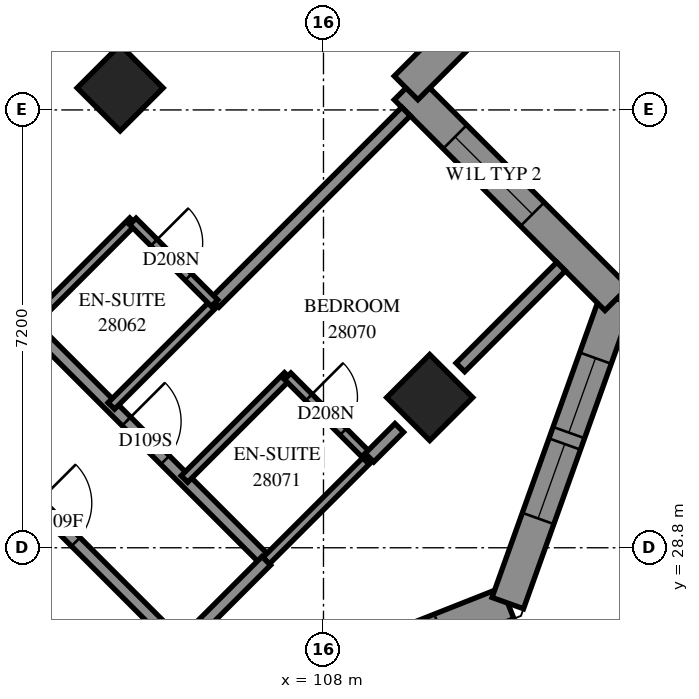
"""IFC4 building model, lengths in metres.
Left out: names, types, materials, properties, quantities, classifications, styles, units other than length and angle.
Written with IfcOpenShell. Run it as: python <this file> out.ifc"""

import sys

from ifc_helpers import new_model, si_unit, direction, frame, frame_2d, origin, origin_2d, place, context, subcontext, project, spatial, polyline, rectangle, outline, extrude, element, fill, save


model = new_model("IFC4")
c1 = context("Model", 3, precision=1e-05, world=origin(), true_north=direction((0.0, 1.0)))
c2 = subcontext(c1, "Body", "Model", "MODEL_VIEW")
j1 = project(units=[si_unit("LENGTHUNIT", "METRE"), si_unit("PLANEANGLEUNIT", "RADIAN")], contexts=[c1])
p1 = place(None, origin())
s1 = spatial("IfcSite", under=j1, at=p1, CompositionType="ELEMENT")
p2 = place(p1, origin())
s2 = spatial("IfcBuilding", under=s1, at=p2, CompositionType="ELEMENT")
p3 = place(p2, frame((0.0, 0.0, 105.0)))
s3 = spatial("IfcBuildingStorey", under=s2, at=p3, CompositionType="ELEMENT", Elevation=105.0)
for number, where, z_axis, x_axis in (
    (1, (104.656, 36.362, 0.0), (0.0, 0.0, 1.0), (0.707, -0.707, 0.0)),
    (2, (109.747, 31.271, 0.0), (0.0, 0.0, 1.0), (0.707, -0.707, 0.0)),
):
    element("IfcColumn", number, at=place(p3, frame(where, z_axis=z_axis, x_axis=x_axis)), inside=s3, PredefinedType="COLUMN", context=c2, shape_type="SweptSolid", body=[
        extrude(rectangle(XDim=1.0, YDim=1.0, at=origin_2d()), origin(), (0.0, 0.0, 1.0), 3.1),
    ])
p4 = place(p3, frame((105.889, 25.857, 0.0), z_axis=(0.0, 0.0, 1.0), x_axis=(0.9299302272, 0.3677360094, 0.0)))
e3 = element("IfcWall", 3, at=p4, inside=s3, PredefinedType="SOLIDWALL", context=c2, shape_type="SweptSolid", body=[
    extrude(outline(polyline([(0.119, -0.275), (5.653, -0.275), (5.404, 0.275), (-0.119, 0.275), (0.119, -0.275)])), origin(), (0.0, 0.0, 1.0), 3.1),
])
p5 = place(p4, frame((0.635, 0.0, 0.5)))
e4 = element("IfcOpeningElement", 4, at=p5, cuts=e3, PredefinedType="OPENING", context=c2, shape_type="SweptSolid", body=[
    extrude(rectangle(XDim=1.2, YDim=2.45, at=frame_2d((0.6, 1.225))), frame((0.0, 0.285, 0.0), z_axis=(0.0, -1.0, 0.0), x_axis=(1.0, 0.0, 0.0)), (0.0, 0.0, 1.0), 0.57),
])
p6 = place(p4, frame((3.137, 0.0, 0.5)))
e5 = element("IfcOpeningElement", 5, at=p6, cuts=e3, PredefinedType="OPENING", context=c2, shape_type="SweptSolid", body=[
    extrude(rectangle(XDim=1.2, YDim=2.45, at=frame_2d((0.6, 1.225))), frame((0.0, 0.285, 0.0), z_axis=(0.0, -1.0, 0.0), x_axis=(1.0, 0.0, 0.0)), (0.0, 0.0, 1.0), 0.57),
])
p7 = place(p3, frame((111.031, 27.89, 0.0), z_axis=(0.0, 0.0, 1.0), x_axis=(0.3371475074, 0.9414518353, 0.0)))
e6 = element("IfcWall", 6, at=p7, inside=s3, PredefinedType="SOLIDWALL", context=c2, shape_type="SweptSolid", body=[
    extrude(outline(polyline([(-0.124, -0.275), (5.492, -0.275), (5.144, 0.275), (0.124, 0.275), (-0.124, -0.275)])), origin(), (0.0, 0.0, 1.0), 3.1),
])
p8 = place(p7, frame((1.479, 0.0, 0.5)))
e7 = element("IfcOpeningElement", 7, at=p8, cuts=e6, PredefinedType="OPENING", context=c2, shape_type="SweptSolid", body=[
    extrude(rectangle(XDim=1.3, YDim=2.45, at=frame_2d((0.65, 1.225))), frame((0.0, 0.285, 0.0), z_axis=(0.0, -1.0, 0.0), x_axis=(1.0, 0.0, 0.0)), (0.0, 0.0, 1.0), 0.57),
])
p9 = place(p7, frame((2.979, 0.0, 0.5)))
e8 = element("IfcOpeningElement", 8, at=p9, cuts=e6, PredefinedType="OPENING", context=c2, shape_type="SweptSolid", body=[
    extrude(rectangle(XDim=1.3, YDim=2.45, at=frame_2d((0.65, 1.225))), frame((0.0, 0.285, 0.0), z_axis=(0.0, -1.0, 0.0), x_axis=(1.0, 0.0, 0.0)), (0.0, 0.0, 1.0), 0.57),
])
p10 = place(p3, frame((112.823, 32.896, 0.0), z_axis=(0.0, 0.0, 1.0), x_axis=(-0.7071067812, 0.7071067812, 0.0)))
e9 = element("IfcWall", 9, at=p10, inside=s3, PredefinedType="SOLIDWALL", context=c2, shape_type="SweptSolid", body=[
    extrude(outline(polyline([(-0.174, -0.275), (4.626, -0.275), (5.176, 0.275), (0.174, 0.275), (-0.174, -0.275)])), origin(), (0.0, 0.0, 1.0), 3.1),
])
p11 = place(p10, frame((1.963, 0.0, 0.6)))
e10 = element("IfcOpeningElement", 10, at=p11, cuts=e9, PredefinedType="OPENING", context=c2, shape_type="SweptSolid", body=[
    extrude(rectangle(XDim=1.8, YDim=1.9, at=frame_2d((0.9, 0.95))), frame((0.0, 0.285, 0.0), z_axis=(0.0, -1.0, 0.0), x_axis=(1.0, 0.0, 0.0)), (0.0, 0.0, 1.0), 0.57),
])
p12 = place(p3, frame((109.358, 36.362, 0.0), z_axis=(0.0, 0.0, 1.0), x_axis=(0.7071067812, 0.7071067812, 0.0)))
e11 = element("IfcWall", 11, at=p12, inside=s3, PredefinedType="SOLIDWALL", context=c2, shape_type="SweptSolid", body=[
    extrude(outline(polyline([(0.275, -0.275), (6.187, -0.275), (5.429, 0.275), (-0.275, 0.275), (0.275, -0.275)])), origin(), (0.0, 0.0, 1.0), 3.1),
])
p13 = place(p12, frame((1.137, 0.0, 0.6)))
e12 = element("IfcOpeningElement", 12, at=p13, cuts=e11, PredefinedType="OPENING", context=c2, shape_type="SweptSolid", body=[
    extrude(rectangle(XDim=1.8, YDim=1.9, at=frame_2d((0.9, 0.95))), frame((0.0, 0.285, 0.0), z_axis=(0.0, -1.0, 0.0), x_axis=(1.0, 0.0, 0.0)), (0.0, 0.0, 1.0), 0.57),
])
p14 = place(p3, frame((92.004, 40.819, 0.0), z_axis=(0.0, 0.0, 1.0), x_axis=(0.7071067812, -0.7071067812, 0.0)))
e13 = element("IfcWall", 13, at=p14, inside=s3, PredefinedType="PARTITIONING", context=c2, shape_type="SweptSolid", body=[
    extrude(rectangle(XDim=19.298, YDim=0.2, at=frame_2d((9.649, 0.0))), origin(), (0.0, 0.0, 1.0), 3.1),
])
p15 = place(p14, frame((3.489, 0.0, 0.0)))
e14 = element("IfcOpeningElement", 14, at=p15, cuts=e13, PredefinedType="OPENING", context=c2, shape_type="SweptSolid", body=[
    extrude(rectangle(XDim=0.9, YDim=2.1, at=frame_2d((0.45, 1.05))), frame((0.0, 0.11, 0.0), z_axis=(0.0, -1.0, 0.0), x_axis=(1.0, 0.0, 0.0)), (0.0, 0.0, 1.0), 0.22),
])
p16 = place(p14, frame((9.319, 0.0, 0.0)))
e15 = element("IfcOpeningElement", 15, at=p16, cuts=e13, PredefinedType="OPENING", context=c2, shape_type="SweptSolid", body=[
    extrude(rectangle(XDim=0.9, YDim=2.1, at=frame_2d((0.45, 1.05))), frame((0.0, 0.11, 0.0), z_axis=(0.0, -1.0, 0.0), x_axis=(1.0, 0.0, 0.0)), (0.0, 0.0, 1.0), 0.22),
])
p17 = place(p14, frame((15.961, 0.0, 0.0)))
e16 = element("IfcOpeningElement", 16, at=p17, cuts=e13, PredefinedType="OPENING", context=c2, shape_type="SweptSolid", body=[
    extrude(rectangle(XDim=0.9, YDim=2.1, at=frame_2d((0.45, 1.05))), frame((0.0, 0.11, 0.0), z_axis=(0.0, -1.0, 0.0), x_axis=(1.0, 0.0, 0.0)), (0.0, 0.0, 1.0), 0.22),
])
p18 = place(p3, frame((99.423, 36.221, 0.0), z_axis=(0.0, 0.0, 1.0), x_axis=(0.7071067812, 0.7071067812, 0.0)))
e17 = element("IfcWall", 17, at=p18, inside=s3, PredefinedType="PARTITIONING", context=c2, shape_type="SweptSolid", body=[
    extrude(rectangle(XDim=12.099, YDim=0.2, at=frame_2d((6.049, 0.0))), origin(), (0.0, 0.0, 1.0), 3.1),
])
p19 = place(p3, frame((103.239, 32.399, 0.0), z_axis=(0.0, 0.0, 1.0), x_axis=(0.7071067812, -0.7071067812, 0.0)))
e18 = element("IfcWall", 18, at=p19, inside=s3, PredefinedType="PARTITIONING", context=c2, shape_type="SweptSolid", body=[
    extrude(rectangle(XDim=5.399, YDim=0.2, at=frame_2d((2.7, 0.0))), origin(), (0.0, 0.0, 1.0), 3.1),
])
p20 = place(p19, frame((2.15, 0.0, 0.0)))
e19 = element("IfcOpeningElement", 19, at=p20, cuts=e18, PredefinedType="OPENING", context=c2, shape_type="SweptSolid", body=[
    extrude(rectangle(XDim=0.9, YDim=2.1, at=frame_2d((0.45, 1.05))), frame((0.0, 0.11, 0.0), z_axis=(0.0, -1.0, 0.0), x_axis=(1.0, 0.0, 0.0)), (0.0, 0.0, 1.0), 0.22),
])
p21 = place(p3, frame((106.211, 32.827, 0.0), z_axis=(0.0, 0.0, 1.0), x_axis=(0.7071067812, 0.7071067812, 0.0)))
e20 = element("IfcWall", 20, at=p21, inside=s3, PredefinedType="PARTITIONING", context=c2, shape_type="SweptSolid", body=[
    extrude(rectangle(XDim=4.45, YDim=0.2, at=frame_2d((2.225, 0.0))), origin(), (0.0, 0.0, 1.0), 3.1),
])
p22 = place(p3, frame((103.169, 32.473, 0.0), z_axis=(0.0, 0.0, 1.0), x_axis=(0.7071067812, 0.7071067812, 0.0)))
e21 = element("IfcWall", 21, at=p22, inside=s3, PredefinedType="PARTITIONING", context=c2, shape_type="SweptSolid", body=[
    extrude(rectangle(XDim=2.401, YDim=0.15, at=frame_2d((1.201, 0.0))), origin(), (0.0, 0.0, 1.0), 3.1),
])
for number, where, z_axis, x_axis in (
    (22, (104.511, 31.133, 0.0), (0.0, 0.0, 1.0), (0.708, 0.707, 0.0)),
    (23, (105.713, 29.931, 0.0), (0.0, 0.0, 1.0), (0.708, 0.707, 0.0)),
):
    element("IfcWall", number, at=place(p3, frame(where, z_axis=z_axis, x_axis=x_axis)), inside=s3, PredefinedType="PARTITIONING", context=c2, shape_type="SweptSolid", body=[
        extrude(rectangle(XDim=2.4, YDim=0.15, at=frame_2d((1.2, 0.0))), origin(), (0.0, 0.0, 1.0), 3.1),
    ])
p23 = place(p3, frame((107.057, 28.587, 0.0), z_axis=(0.0, 0.0, 1.0), x_axis=(0.7075233388, 0.706689978, 0.0)))
e24 = element("IfcWall", 24, at=p23, inside=s3, PredefinedType="PARTITIONING", context=c2, shape_type="SweptSolid", body=[
    extrude(rectangle(XDim=2.4, YDim=0.15, at=frame_2d((1.2, 0.0))), origin(), (0.0, 0.0, 1.0), 2.6),
])
p24 = place(p3, frame((110.251, 31.767, 0.0), z_axis=(0.0, 0.0, 1.0), x_axis=(0.7066584143, 0.7075548639, 0.0)))
e25 = element("IfcWall", 25, at=p24, inside=s3, PredefinedType="PARTITIONING", context=c2, shape_type="SweptSolid", body=[
    extrude(rectangle(XDim=2.343, YDim=0.2, at=frame_2d((1.171, 0.0))), origin(), (0.0, 0.0, 1.0), 3.1),
])
p25 = place(p3, frame((105.645, 27.171, 0.0), z_axis=(0.0, 0.0, 1.0), x_axis=(0.7071067812, 0.7071067812, 0.0)))
e26 = element("IfcWall", 26, at=p25, inside=s3, PredefinedType="PARTITIONING", context=c2, shape_type="SweptSolid", body=[
    extrude(rectangle(XDim=2.0, YDim=0.2, at=frame_2d((1.0, 0.0))), origin(), (0.0, 0.0, 1.0), 2.6),
])
p26 = place(p3, frame((107.411, 31.621, 0.0), z_axis=(0.0, 0.0, 1.0), x_axis=(0.7071067812, -0.7071067812, 0.0)))
e27 = element("IfcWall", 27, at=p26, inside=s3, PredefinedType="PARTITIONING", context=c2, shape_type="SweptSolid", body=[
    extrude(rectangle(XDim=1.901, YDim=0.15, at=frame_2d((0.95, 0.0))), origin(), (0.0, 0.0, 1.0), 3.1),
])
p27 = place(p26, frame((0.493, 0.0, 0.0)))
e28 = element("IfcOpeningElement", 28, at=p27, cuts=e27, PredefinedType="OPENING", context=c2, shape_type="SweptSolid", body=[
    extrude(rectangle(XDim=0.8, YDim=2.1, at=frame_2d((0.4, 1.05))), frame((0.0, 0.085, 0.0), z_axis=(0.0, -1.0, 0.0), x_axis=(1.0, 0.0, 0.0)), (0.0, 0.0, 1.0), 0.17),
])
p28 = place(p3, frame((104.865, 34.167, 0.0), z_axis=(0.0, 0.0, 1.0), x_axis=(0.7071067812, -0.7071067812, 0.0)))
e29 = element("IfcWall", 29, at=p28, inside=s3, PredefinedType="PARTITIONING", context=c2, shape_type="SweptSolid", body=[
    extrude(rectangle(XDim=1.901, YDim=0.15, at=frame_2d((0.95, 0.0))), origin(), (0.0, 0.0, 1.0), 3.1),
])
p29 = place(p28, frame((0.493, 0.0, 0.0)))
e30 = element("IfcOpeningElement", 30, at=p29, cuts=e29, PredefinedType="OPENING", context=c2, shape_type="SweptSolid", body=[
    extrude(rectangle(XDim=0.8, YDim=2.1, at=frame_2d((0.4, 1.05))), frame((0.0, 0.085, 0.0), z_axis=(0.0, -1.0, 0.0), x_axis=(1.0, 0.0, 0.0)), (0.0, 0.0, 1.0), 0.17),
])
p30 = place(p3, frame((108.756, 30.282, 0.0), z_axis=(0.0, 0.0, 1.0), x_axis=(0.7071067812, 0.7071067812, 0.0)))
e31 = element("IfcWall", 31, at=p30, inside=s3, PredefinedType="PARTITIONING", context=c2, shape_type="SweptSolid", body=[
    extrude(rectangle(XDim=0.693, YDim=0.2, at=frame_2d((0.346, 0.0))), origin(), (0.0, 0.0, 1.0), 2.6),
])
p31 = place(p8, origin())
e32 = element("IfcWindow", 32, at=p31, inside=s3, PartitioningType="SINGLE_PANEL", PredefinedType="WINDOW", context=c2, shape_type="SweptSolid", body=[
    extrude(rectangle(XDim=1.3, YDim=2.45, at=frame_2d((0.65, 1.225))), frame((0.0, 0.155, 0.0), z_axis=(0.0, -1.0, 0.0), x_axis=(1.0, 0.0, 0.0)), (0.0, 0.0, 1.0), 0.06),
])
fill(e7, e32)
p32 = place(p9, origin())
e33 = element("IfcWindow", 33, at=p32, inside=s3, PartitioningType="SINGLE_PANEL", PredefinedType="WINDOW", context=c2, shape_type="SweptSolid", body=[
    extrude(rectangle(XDim=1.3, YDim=2.45, at=frame_2d((0.65, 1.225))), frame((0.0, 0.155, 0.0), z_axis=(0.0, -1.0, 0.0), x_axis=(1.0, 0.0, 0.0)), (0.0, 0.0, 1.0), 0.06),
])
fill(e8, e33)
p33 = place(p11, origin())
e34 = element("IfcWindow", 34, at=p33, inside=s3, PartitioningType="SINGLE_PANEL", PredefinedType="WINDOW", context=c2, shape_type="SweptSolid", body=[
    extrude(rectangle(XDim=1.8, YDim=1.9, at=frame_2d((0.9, 0.95))), frame((0.0, 0.155, 0.0), z_axis=(0.0, -1.0, 0.0), x_axis=(1.0, 0.0, 0.0)), (0.0, 0.0, 1.0), 0.06),
])
fill(e10, e34)
p34 = place(p29, origin())
e35 = element("IfcDoor", 35, at=p34, inside=s3, OperationType="SINGLE_SWING_RIGHT", PredefinedType="DOOR", context=c2, shape_type="SweptSolid", body=[
    extrude(rectangle(XDim=0.8, YDim=2.1, at=frame_2d((0.4, 1.05))), frame((0.0, 0.025, 0.0), z_axis=(0.0, -1.0, 0.0), x_axis=(1.0, 0.0, 0.0)), (0.0, 0.0, 1.0), 0.05),
])
fill(e30, e35)
p35 = place(p17, origin())
e36 = element("IfcDoor", 36, at=p35, inside=s3, OperationType="SINGLE_SWING_RIGHT", PredefinedType="DOOR", context=c2, shape_type="SweptSolid", body=[
    extrude(rectangle(XDim=0.9, YDim=2.1, at=frame_2d((0.45, 1.05))), frame((0.0, 0.025, 0.0), z_axis=(0.0, -1.0, 0.0), x_axis=(1.0, 0.0, 0.0)), (0.0, 0.0, 1.0), 0.05),
])
fill(e16, e36)
p36 = place(p20, origin())
e37 = element("IfcDoor", 37, at=p36, inside=s3, OperationType="SINGLE_SWING_RIGHT", PredefinedType="DOOR", context=c2, shape_type="SweptSolid", body=[
    extrude(rectangle(XDim=0.9, YDim=2.1, at=frame_2d((0.45, 1.05))), frame((0.0, 0.025, 0.0), z_axis=(0.0, -1.0, 0.0), x_axis=(1.0, 0.0, 0.0)), (0.0, 0.0, 1.0), 0.05),
])
fill(e19, e37)
p37 = place(p27, origin())
e38 = element("IfcDoor", 38, at=p37, inside=s3, OperationType="SINGLE_SWING_RIGHT", PredefinedType="DOOR", context=c2, shape_type="SweptSolid", body=[
    extrude(rectangle(XDim=0.8, YDim=2.1, at=frame_2d((0.4, 1.05))), frame((0.0, 0.025, 0.0), z_axis=(0.0, -1.0, 0.0), x_axis=(1.0, 0.0, 0.0)), (0.0, 0.0, 1.0), 0.05),
])
fill(e28, e38)
save(model, sys.argv[1])
